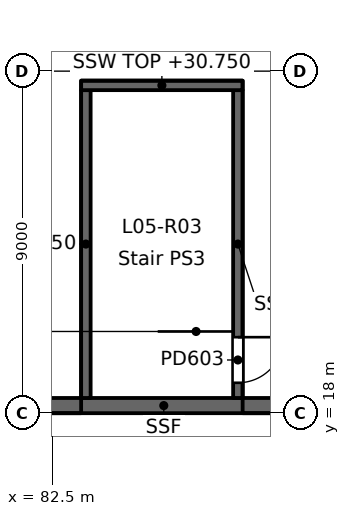
"""IFC4 building model, lengths in metres.
Left out: names, types, materials, properties, quantities, classifications, styles, units other than length and angle.
Written with IfcOpenShell. Run it as: python <this file> out.ifc"""

import sys

from ifc_helpers import new_model, si_unit, direction, frame, frame_2d, origin, place, context, subcontext, project, spatial, rectangle, extrude, element, fill, save


model = new_model("IFC4")
c1 = context("Model", 3, precision=1e-05, world=origin(), true_north=direction((0.0, 1.0)))
c2 = subcontext(c1, "Body", "Model", "MODEL_VIEW")
j1 = project(units=[si_unit("LENGTHUNIT", "METRE"), si_unit("PLANEANGLEUNIT", "RADIAN")], contexts=[c1])
p1 = place(None, origin())
s1 = spatial("IfcSite", under=j1, at=p1, CompositionType="ELEMENT")
p2 = place(p1, origin())
s2 = spatial("IfcBuilding", under=s1, at=p2, CompositionType="ELEMENT")
p3 = place(p2, frame((0.0, 0.0, 26.4)))
s3 = spatial("IfcBuildingStorey", under=s2, at=p3, CompositionType="ELEMENT", Elevation=26.4)
p4 = place(p3, frame((83.375, 18.4, 0.0), z_axis=(0.0, 0.0, 1.0), x_axis=(0.0, 1.0, 0.0)))
e1 = element("IfcWall", 1, at=p4, inside=s3, PredefinedType="SOLIDWALL", context=c2, shape_type="SweptSolid", body=[
    extrude(rectangle(XDim=8.1, YDim=0.25, at=frame_2d((4.05, 0.0))), origin(), (0.0, 0.0, 1.0), 4.35),
])
p5 = place(p3, frame((87.375, 26.5, 0.0), z_axis=(0.0, 0.0, 1.0), x_axis=(0.0, -1.0, 0.0)))
e2 = element("IfcWall", 2, at=p5, inside=s3, PredefinedType="SOLIDWALL", context=c2, shape_type="SweptSolid", body=[
    extrude(rectangle(XDim=8.1, YDim=0.25, at=frame_2d((4.05, 0.0))), origin(), (0.0, 0.0, 1.0), 4.35),
])
p6 = place(p5, frame((6.5, 0.0, 0.0)))
e3 = element("IfcOpeningElement", 3, at=p6, cuts=e2, PredefinedType="OPENING", context=c2, shape_type="SweptSolid", body=[
    extrude(rectangle(XDim=1.2, YDim=2.1, at=frame_2d((0.6, 1.05))), frame((0.0, 0.125, 0.0), z_axis=(0.0, -1.0, 0.0), x_axis=(1.0, 0.0, 0.0)), (0.0, 0.0, 1.0), 0.25),
])
p7 = place(p3, frame((83.25, 26.625, 0.0), z_axis=(0.0, 0.0, 1.0), x_axis=(1.0, 0.0, 0.0)))
e4 = element("IfcWall", 4, at=p7, inside=s3, PredefinedType="SOLIDWALL", context=c2, shape_type="SweptSolid", body=[
    extrude(rectangle(XDim=4.25, YDim=0.25, at=frame_2d((2.125, 0.0))), origin(), (0.0, 0.0, 1.0), 4.35),
])
p8 = place(p3, frame((89.1, 18.2, 0.0), z_axis=(0.0, 0.0, 1.0), x_axis=(-1.0, 0.0, 0.0)))
e5 = element("IfcWall", 5, at=p8, inside=s3, PredefinedType="SOLIDWALL", context=c2, shape_type="SweptSolid", body=[
    extrude(rectangle(XDim=7.35, YDim=0.4, at=frame_2d((3.675, 0.0))), origin(), (0.0, 0.0, 1.0), 4.35),
])
p9 = place(p6, origin())
e6 = element("IfcDoor", 6, at=p9, inside=s3, OperationType="SINGLE_SWING_LEFT", PredefinedType="DOOR", context=c2, shape_type="SweptSolid", body=[
    extrude(rectangle(XDim=1.2, YDim=2.1, at=frame_2d((0.6, 1.05))), frame((0.0, 0.025, 0.0), z_axis=(0.0, -1.0, 0.0), x_axis=(1.0, 0.0, 0.0)), (0.0, 0.0, 1.0), 0.05),
])
fill(e3, e6)
save(model, sys.argv[1])
